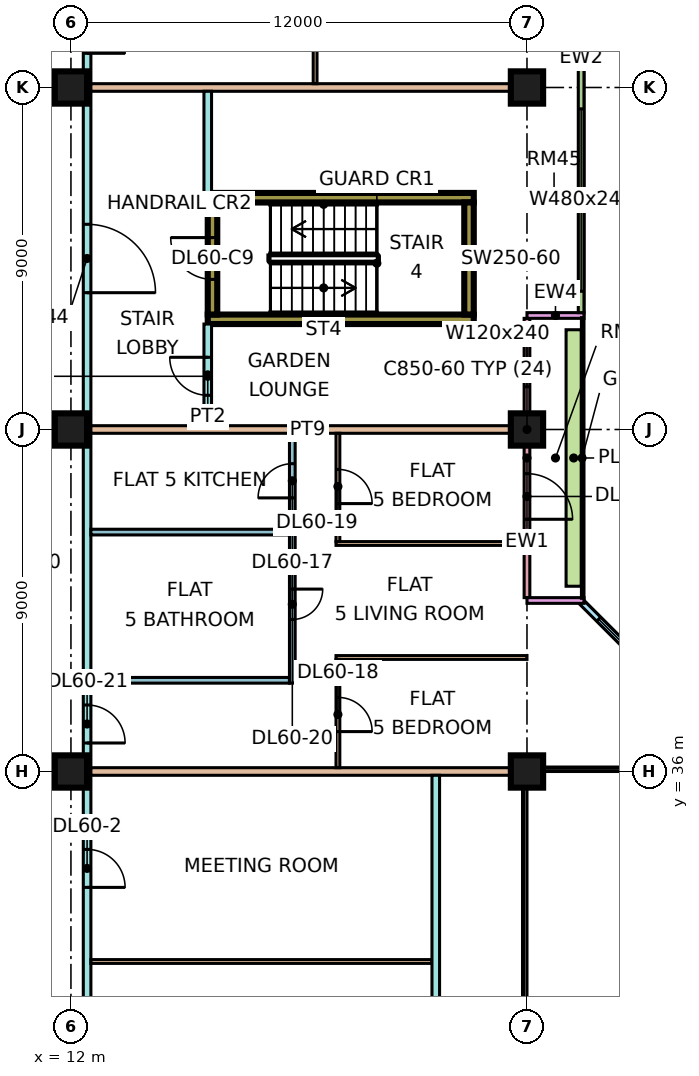
"""IFC4 building model, lengths in metres.
Left out: names, types, materials, properties, quantities, classifications, styles, units other than length and angle.
Written with IfcOpenShell. Run it as: python <this file> out.ifc"""

import sys

from ifc_helpers import new_model, si_unit, direction, frame, frame_2d, origin, origin_2d, place, context, subcontext, project, spatial, rectangle, extrude, element, fill, save


model = new_model("IFC4")
c1 = context("Model", 3, precision=1e-05, world=origin(), true_north=direction((0.0, 1.0)))
c2 = subcontext(c1, "Body", "Model", "MODEL_VIEW")
j1 = project(units=[si_unit("LENGTHUNIT", "METRE"), si_unit("PLANEANGLEUNIT", "RADIAN")], contexts=[c1])
p1 = place(None, origin())
s1 = spatial("IfcSite", under=j1, at=p1, CompositionType="ELEMENT")
p2 = place(p1, origin())
s2 = spatial("IfcBuilding", under=s1, at=p2, CompositionType="ELEMENT")
p3 = place(p2, frame((0.0, 0.0, 252.9)))
s3 = spatial("IfcBuildingStorey", under=s2, at=p3, CompositionType="ELEMENT", Elevation=252.9)
for number, where, z_axis, x_axis in (
    (1, (12.0, 36.0, 0.0), (0.0, 0.0, 1.0), (1.0, 0.0, 0.0)),
    (2, (12.0, 45.0, 0.0), (0.0, 0.0, 1.0), (1.0, 0.0, 0.0)),
    (3, (12.0, 54.0, 0.0), (0.0, 0.0, 1.0), (1.0, 0.0, 0.0)),
    (4, (24.0, 36.0, 0.0), (0.0, 0.0, 1.0), (1.0, 0.0, 0.0)),
    (5, (24.0, 45.0, 0.0), (0.0, 0.0, 1.0), (1.0, 0.0, 0.0)),
    (6, (24.0, 54.0, 0.0), (0.0, 0.0, 1.0), (1.0, 0.0, 0.0)),
):
    element("IfcColumn", number, at=place(p3, frame(where, z_axis=z_axis, x_axis=x_axis)), inside=s3, PredefinedType="COLUMN", context=c2, shape_type="SweptSolid", body=[
        extrude(rectangle(XDim=0.85, YDim=0.85, at=origin_2d()), origin(), (0.0, 0.0, 1.0), 3.75),
    ])
for number, where, z_axis, x_axis in (
    (7, (15.6, 47.9, 0.0), (0.0, 0.0, 1.0), (1.0, 0.0, 0.0)),
    (8, (15.6, 51.1, 0.0), (0.0, 0.0, 1.0), (1.0, 0.0, 0.0)),
):
    element("IfcWall", number, at=place(p3, frame(where, z_axis=z_axis, x_axis=x_axis)), inside=s3, PredefinedType="SHEAR", context=c2, shape_type="SweptSolid", body=[
        extrude(rectangle(XDim=7.0, YDim=0.25, at=frame_2d((3.5, 0.0))), origin(), (0.0, 0.0, 1.0), 3.75),
    ])
p4 = place(p3, frame((15.725, 48.025, 0.0), z_axis=(0.0, 0.0, 1.0), x_axis=(0.0, 1.0, 0.0)))
e9 = element("IfcWall", 9, at=p4, inside=s3, PredefinedType="SHEAR", context=c2, shape_type="SweptSolid", body=[
    extrude(rectangle(XDim=2.95, YDim=0.25, at=frame_2d((1.475, 0.0))), origin(), (0.0, 0.0, 1.0), 3.75),
])
p5 = place(p4, frame((0.925, 0.0, 0.0)))
e10 = element("IfcOpeningElement", 10, at=p5, cuts=e9, PredefinedType="OPENING", context=c2, shape_type="SweptSolid", body=[
    extrude(rectangle(XDim=1.1, YDim=2.2, at=frame_2d((0.55, 1.1))), frame((0.0, 0.135, 0.0), z_axis=(0.0, -1.0, 0.0), x_axis=(1.0, 0.0, 0.0)), (0.0, 0.0, 1.0), 0.27),
])
p6 = place(p3, frame((22.475, 48.025, 0.0), z_axis=(0.0, 0.0, 1.0), x_axis=(0.0, 1.0, 0.0)))
e11 = element("IfcWall", 11, at=p6, inside=s3, PredefinedType="SHEAR", context=c2, shape_type="SweptSolid", body=[
    extrude(rectangle(XDim=2.95, YDim=0.25, at=frame_2d((1.475, 0.0))), origin(), (0.0, 0.0, 1.0), 3.75),
])
p7 = place(p3, frame((28.447, 37.447, 0.0), z_axis=(0.0, 0.0, 1.0), x_axis=(-0.707106781187, 0.707106781187, 0.0)))
e12 = element("IfcWall", 12, at=p7, inside=s3, PredefinedType="SOLIDWALL", context=c2, shape_type="SweptSolid", body=[
    extrude(rectangle(XDim=4.243, YDim=0.15, at=frame_2d((2.121, 0.0))), origin(), (0.0, 0.0, 1.0), 3.3),
])
p8 = place(p7, frame((0.621, 0.0, 0.45)))
e13 = element("IfcOpeningElement", 13, at=p8, cuts=e12, PredefinedType="OPENING", context=c2, shape_type="SweptSolid", body=[
    extrude(rectangle(XDim=3.0, YDim=2.4, at=frame_2d((1.5, 1.2))), frame((0.0, 0.085, 0.0), z_axis=(0.0, -1.0, 0.0), x_axis=(1.0, 0.0, 0.0)), (0.0, 0.0, 1.0), 0.17),
])
p9 = place(p3, frame((24.0, 40.575, 0.0), z_axis=(0.0, 0.0, 1.0), x_axis=(0.0, 1.0, 0.0)))
e14 = element("IfcWall", 14, at=p9, inside=s3, PredefinedType="SOLIDWALL", context=c2, shape_type="SweptSolid", body=[
    extrude(rectangle(XDim=7.35, YDim=0.15, at=frame_2d((3.675, 0.0))), origin(), (0.0, 0.0, 1.0), 3.3),
])
p10 = place(p9, frame((2.062, 0.0, 0.0)))
e15 = element("IfcOpeningElement", 15, at=p10, cuts=e14, PredefinedType="OPENING", context=c2, shape_type="SweptSolid", body=[
    extrude(rectangle(XDim=1.2, YDim=2.4, at=frame_2d((0.6, 1.2))), frame((0.0, 0.085, 0.0), z_axis=(0.0, -1.0, 0.0), x_axis=(1.0, 0.0, 0.0)), (0.0, 0.0, 1.0), 0.17),
])
p11 = place(p9, frame((5.55, 0.0, 0.45)))
e16 = element("IfcOpeningElement", 16, at=p11, cuts=e14, PredefinedType="OPENING", context=c2, shape_type="SweptSolid", body=[
    extrude(rectangle(XDim=1.2, YDim=2.4, at=frame_2d((0.6, 1.2))), frame((0.0, 0.085, 0.0), z_axis=(0.0, -1.0, 0.0), x_axis=(1.0, 0.0, 0.0)), (0.0, 0.0, 1.0), 0.17),
])
for number, where, z_axis, x_axis in (
    (17, (25.5, 40.5, 0.0), (0.0, 0.0, 1.0), (-1.0, 0.0, 0.0)),
    (18, (25.5, 48.0, 0.0), (0.0, 0.0, 1.0), (-1.0, 0.0, 0.0)),
):
    element("IfcWall", number, at=place(p3, frame(where, z_axis=z_axis, x_axis=x_axis)), inside=s3, PredefinedType="SOLIDWALL", context=c2, shape_type="SweptSolid", body=[
        extrude(rectangle(XDim=1.5, YDim=0.15, at=frame_2d((0.75, 0.0))), origin(), (0.0, 0.0, 1.0), 3.3),
    ])
p12 = place(p3, frame((25.425, 48.075, 0.0), z_axis=(0.0, 0.0, 1.0), x_axis=(0.0, 1.0, 0.0)))
e19 = element("IfcWall", 19, at=p12, inside=s3, PredefinedType="SOLIDWALL", context=c2, shape_type="SweptSolid", body=[
    extrude(rectangle(XDim=13.425, YDim=0.15, at=frame_2d((6.712, 0.0))), origin(), (0.0, 0.0, 1.0), 3.3),
])
p13 = place(p12, frame((0.562, 0.0, 0.45)))
e20 = element("IfcOpeningElement", 20, at=p13, cuts=e19, PredefinedType="OPENING", context=c2, shape_type="SweptSolid", body=[
    extrude(rectangle(XDim=4.8, YDim=2.4, at=frame_2d((2.4, 1.2))), frame((0.0, 0.085, 0.0), z_axis=(0.0, -1.0, 0.0), x_axis=(1.0, 0.0, 0.0)), (0.0, 0.0, 1.0), 0.17),
])
p14 = place(p12, frame((6.525, 0.0, 0.45)))
e21 = element("IfcOpeningElement", 21, at=p14, cuts=e19, PredefinedType="OPENING", context=c2, shape_type="SweptSolid", body=[
    extrude(rectangle(XDim=1.8, YDim=2.4, at=frame_2d((0.9, 1.2))), frame((0.0, 0.085, 0.0), z_axis=(0.0, -1.0, 0.0), x_axis=(1.0, 0.0, 0.0)), (0.0, 0.0, 1.0), 0.17),
])
p15 = place(p12, frame((9.675, 0.0, 0.45)))
e22 = element("IfcOpeningElement", 22, at=p15, cuts=e19, PredefinedType="OPENING", context=c2, shape_type="SweptSolid", body=[
    extrude(rectangle(XDim=3.0, YDim=2.4, at=frame_2d((1.5, 1.2))), frame((0.0, 0.085, 0.0), z_axis=(0.0, -1.0, 0.0), x_axis=(1.0, 0.0, 0.0)), (0.0, 0.0, 1.0), 0.17),
])
p16 = place(p3, frame((25.229, 40.875, 0.0), z_axis=(0.0, 0.0, 1.0), x_axis=(0.0, 1.0, 0.0)))
e23 = element("IfcWall", 23, at=p16, inside=s3, PredefinedType="SOLIDWALL", context=c2, shape_type="SweptSolid", body=[
    extrude(rectangle(XDim=6.75, YDim=0.4, at=frame_2d((3.375, 0.0))), origin(), (0.0, 0.0, 1.0), 0.7),
])
p17 = place(p3, frame((12.425, 20.0, 0.0), z_axis=(0.0, 0.0, 1.0), x_axis=(0.0, 1.0, 0.0)))
e24 = element("IfcWall", 24, at=p17, inside=s3, PredefinedType="PARTITIONING", context=c2, shape_type="SweptSolid", body=[
    extrude(rectangle(XDim=42.926, YDim=0.2, at=frame_2d((21.463, 0.0))), origin(), (0.0, 0.0, 1.0), 3.3),
])
p18 = place(p17, frame((7.0, 0.0, 0.0)))
e25 = element("IfcOpeningElement", 25, at=p18, cuts=e24, PredefinedType="OPENING", context=c2, shape_type="SweptSolid", body=[
    extrude(rectangle(XDim=1.0, YDim=2.1, at=frame_2d((0.5, 1.05))), frame((0.0, 0.11, 0.0), z_axis=(0.0, -1.0, 0.0), x_axis=(1.0, 0.0, 0.0)), (0.0, 0.0, 1.0), 0.22),
])
p19 = place(p17, frame((12.95, 0.0, 0.0)))
e26 = element("IfcOpeningElement", 26, at=p19, cuts=e24, PredefinedType="OPENING", context=c2, shape_type="SweptSolid", body=[
    extrude(rectangle(XDim=1.0, YDim=2.1, at=frame_2d((0.5, 1.05))), frame((0.0, 0.11, 0.0), z_axis=(0.0, -1.0, 0.0), x_axis=(1.0, 0.0, 0.0)), (0.0, 0.0, 1.0), 0.22),
])
p20 = place(p17, frame((16.75, 0.0, 0.0)))
e27 = element("IfcOpeningElement", 27, at=p20, cuts=e24, PredefinedType="OPENING", context=c2, shape_type="SweptSolid", body=[
    extrude(rectangle(XDim=1.0, YDim=2.1, at=frame_2d((0.5, 1.05))), frame((0.0, 0.11, 0.0), z_axis=(0.0, -1.0, 0.0), x_axis=(1.0, 0.0, 0.0)), (0.0, 0.0, 1.0), 0.22),
])
p21 = place(p17, frame((34.9, 0.0, 0.0)))
e28 = element("IfcOpeningElement", 28, at=p21, cuts=e24, PredefinedType="OPENING", context=c2, shape_type="SweptSolid", body=[
    extrude(rectangle(XDim=1.0, YDim=2.1, at=frame_2d((0.5, 1.05))), frame((0.0, 0.11, 0.0), z_axis=(0.0, -1.0, 0.0), x_axis=(1.0, 0.0, 0.0)), (0.0, 0.0, 1.0), 0.22),
])
p22 = place(p17, frame((1.15, 0.0, 0.0)))
e29 = element("IfcOpeningElement", 29, at=p22, cuts=e24, PredefinedType="OPENING", context=c2, shape_type="SweptSolid", body=[
    extrude(rectangle(XDim=1.8, YDim=2.1, at=frame_2d((0.9, 1.05))), frame((0.0, 0.11, 0.0), z_axis=(0.0, -1.0, 0.0), x_axis=(1.0, 0.0, 0.0)), (0.0, 0.0, 1.0), 0.22),
])
p23 = place(p17, frame((28.6, 0.0, 0.0)))
e30 = element("IfcOpeningElement", 30, at=p23, cuts=e24, PredefinedType="OPENING", context=c2, shape_type="SweptSolid", body=[
    extrude(rectangle(XDim=1.8, YDim=2.1, at=frame_2d((0.9, 1.05))), frame((0.0, 0.11, 0.0), z_axis=(0.0, -1.0, 0.0), x_axis=(1.0, 0.0, 0.0)), (0.0, 0.0, 1.0), 0.22),
])
p24 = place(p3, frame((12.525, 31.0, 0.0), z_axis=(0.0, 0.0, 1.0), x_axis=(1.0, 0.0, 0.0)))
e31 = element("IfcWall", 31, at=p24, inside=s3, PredefinedType="PARTITIONING", context=c2, shape_type="SweptSolid", body=[
    extrude(rectangle(XDim=8.975, YDim=0.1, at=frame_2d((4.488, 0.0))), origin(), (0.0, 0.0, 1.0), 3.3),
])
p25 = place(p3, frame((12.525, 36.0, 0.0), z_axis=(0.0, 0.0, 1.0), x_axis=(1.0, 0.0, 0.0)))
e32 = element("IfcWall", 32, at=p25, inside=s3, PredefinedType="PARTITIONING", context=c2, shape_type="SweptSolid", body=[
    extrude(rectangle(XDim=11.475, YDim=0.2, at=frame_2d((5.738, 0.0))), origin(), (0.0, 0.0, 1.0), 3.3),
])
for number, where, z_axis, x_axis in (
    (33, (12.525, 38.4, 0.0), (0.0, 0.0, 1.0), (1.0, 0.0, 0.0)),
    (34, (12.525, 42.3, 0.0), (0.0, 0.0, 1.0), (1.0, 0.0, 0.0)),
):
    element("IfcWall", number, at=place(p3, frame(where, z_axis=z_axis, x_axis=x_axis)), inside=s3, PredefinedType="PARTITIONING", context=c2, shape_type="SweptSolid", body=[
        extrude(rectangle(XDim=5.225, YDim=0.15, at=frame_2d((2.613, 0.0))), origin(), (0.0, 0.0, 1.0), 3.3),
    ])
p26 = place(p3, frame((12.525, 45.0, 0.0), z_axis=(0.0, 0.0, 1.0), x_axis=(1.0, 0.0, 0.0)))
e35 = element("IfcWall", 35, at=p26, inside=s3, PredefinedType="PARTITIONING", context=c2, shape_type="SweptSolid", body=[
    extrude(rectangle(XDim=11.401, YDim=0.2, at=frame_2d((5.701, 0.0))), origin(), (0.0, 0.0, 1.0), 3.3),
])
p27 = place(p3, frame((12.525, 54.0, 0.0), z_axis=(0.0, 0.0, 1.0), x_axis=(1.0, 0.0, 0.0)))
e36 = element("IfcWall", 36, at=p27, inside=s3, PredefinedType="PARTITIONING", context=c2, shape_type="SweptSolid", body=[
    extrude(rectangle(XDim=11.475, YDim=0.2, at=frame_2d((5.738, 0.0))), origin(), (0.0, 0.0, 1.0), 3.3),
])
p28 = place(p3, frame((15.6, 45.1, 0.0), z_axis=(0.0, 0.0, 1.0), x_axis=(0.0, 1.0, 0.0)))
e37 = element("IfcWall", 37, at=p28, inside=s3, PredefinedType="PARTITIONING", context=c2, shape_type="SweptSolid", body=[
    extrude(rectangle(XDim=2.675, YDim=0.2, at=frame_2d((1.337, 0.0))), origin(), (0.0, 0.0, 1.0), 3.3),
])
p29 = place(p28, frame((0.8, 0.0, 0.0)))
e38 = element("IfcOpeningElement", 38, at=p29, cuts=e37, PredefinedType="OPENING", context=c2, shape_type="SweptSolid", body=[
    extrude(rectangle(XDim=1.0, YDim=2.1, at=frame_2d((0.5, 1.05))), frame((0.0, 0.11, 0.0), z_axis=(0.0, -1.0, 0.0), x_axis=(1.0, 0.0, 0.0)), (0.0, 0.0, 1.0), 0.22),
])
p30 = place(p3, frame((15.6, 51.225, 0.0), z_axis=(0.0, 0.0, 1.0), x_axis=(0.0, 1.0, 0.0)))
e39 = element("IfcWall", 39, at=p30, inside=s3, PredefinedType="PARTITIONING", context=c2, shape_type="SweptSolid", body=[
    extrude(rectangle(XDim=2.675, YDim=0.2, at=frame_2d((1.337, 0.0))), origin(), (0.0, 0.0, 1.0), 3.3),
])
p31 = place(p3, frame((17.825, 38.325, 0.0), z_axis=(0.0, 0.0, 1.0), x_axis=(0.0, 1.0, 0.0)))
e40 = element("IfcWall", 40, at=p31, inside=s3, PredefinedType="PARTITIONING", context=c2, shape_type="SweptSolid", body=[
    extrude(rectangle(XDim=6.575, YDim=0.15, at=frame_2d((3.288, 0.0))), origin(), (0.0, 0.0, 1.0), 3.3),
])
p32 = place(p31, frame((1.675, 0.0, 0.0)))
e41 = element("IfcOpeningElement", 41, at=p32, cuts=e40, PredefinedType="OPENING", context=c2, shape_type="SweptSolid", body=[
    extrude(rectangle(XDim=0.8, YDim=2.1, at=frame_2d((0.4, 1.05))), frame((0.0, 0.085, 0.0), z_axis=(0.0, -1.0, 0.0), x_axis=(1.0, 0.0, 0.0)), (0.0, 0.0, 1.0), 0.17),
])
p33 = place(p31, frame((4.875, 0.0, 0.0)))
e42 = element("IfcOpeningElement", 42, at=p33, cuts=e40, PredefinedType="OPENING", context=c2, shape_type="SweptSolid", body=[
    extrude(rectangle(XDim=0.9, YDim=2.1, at=frame_2d((0.45, 1.05))), frame((0.0, 0.085, 0.0), z_axis=(0.0, -1.0, 0.0), x_axis=(1.0, 0.0, 0.0)), (0.0, 0.0, 1.0), 0.17),
])
p34 = place(p3, frame((18.425, 54.1, 0.0), z_axis=(0.0, 0.0, 1.0), x_axis=(0.0, 1.0, 0.0)))
e43 = element("IfcWall", 43, at=p34, inside=s3, PredefinedType="PARTITIONING", context=c2, shape_type="SweptSolid", body=[
    extrude(rectangle(XDim=2.85, YDim=0.1, at=frame_2d((1.425, 0.0))), origin(), (0.0, 0.0, 1.0), 3.3),
])
p35 = place(p34, frame((0.95, 0.0, 0.0)))
e44 = element("IfcOpeningElement", 44, at=p35, cuts=e43, PredefinedType="OPENING", context=c2, shape_type="SweptSolid", body=[
    extrude(rectangle(XDim=0.9, YDim=2.1, at=frame_2d((0.45, 1.05))), frame((0.0, 0.06, 0.0), z_axis=(0.0, -1.0, 0.0), x_axis=(1.0, 0.0, 0.0)), (0.0, 0.0, 1.0), 0.12),
])
p36 = place(p3, frame((18.975, 39.0, 0.0), z_axis=(0.0, 0.0, 1.0), x_axis=(1.0, 0.0, 0.0)))
e45 = element("IfcWall", 45, at=p36, inside=s3, PredefinedType="PARTITIONING", context=c2, shape_type="SweptSolid", body=[
    extrude(rectangle(XDim=5.025, YDim=0.1, at=frame_2d((2.512, 0.0))), origin(), (0.0, 0.0, 1.0), 3.3),
])
p37 = place(p3, frame((18.975, 42.0, 0.0), z_axis=(0.0, 0.0, 1.0), x_axis=(1.0, 0.0, 0.0)))
e46 = element("IfcWall", 46, at=p37, inside=s3, PredefinedType="PARTITIONING", context=c2, shape_type="SweptSolid", body=[
    extrude(rectangle(XDim=4.951, YDim=0.1, at=frame_2d((2.476, 0.0))), origin(), (0.0, 0.0, 1.0), 3.3),
])
p38 = place(p3, frame((19.025, 36.1, 0.0), z_axis=(0.0, 0.0, 1.0), x_axis=(0.0, 1.0, 0.0)))
e47 = element("IfcWall", 47, at=p38, inside=s3, PredefinedType="PARTITIONING", context=c2, shape_type="SweptSolid", body=[
    extrude(rectangle(XDim=2.85, YDim=0.1, at=frame_2d((1.425, 0.0))), origin(), (0.0, 0.0, 1.0), 3.3),
])
p39 = place(p38, frame((0.95, 0.0, 0.0)))
e48 = element("IfcOpeningElement", 48, at=p39, cuts=e47, PredefinedType="OPENING", context=c2, shape_type="SweptSolid", body=[
    extrude(rectangle(XDim=0.9, YDim=2.1, at=frame_2d((0.45, 1.05))), frame((0.0, 0.06, 0.0), z_axis=(0.0, -1.0, 0.0), x_axis=(1.0, 0.0, 0.0)), (0.0, 0.0, 1.0), 0.12),
])
p40 = place(p3, frame((19.025, 42.05, 0.0), z_axis=(0.0, 0.0, 1.0), x_axis=(0.0, 1.0, 0.0)))
e49 = element("IfcWall", 49, at=p40, inside=s3, PredefinedType="PARTITIONING", context=c2, shape_type="SweptSolid", body=[
    extrude(rectangle(XDim=2.85, YDim=0.1, at=frame_2d((1.425, 0.0))), origin(), (0.0, 0.0, 1.0), 3.3),
])
p41 = place(p40, frame((1.0, 0.0, 0.0)))
e50 = element("IfcOpeningElement", 50, at=p41, cuts=e49, PredefinedType="OPENING", context=c2, shape_type="SweptSolid", body=[
    extrude(rectangle(XDim=0.9, YDim=2.1, at=frame_2d((0.45, 1.05))), frame((0.0, 0.06, 0.0), z_axis=(0.0, -1.0, 0.0), x_axis=(1.0, 0.0, 0.0)), (0.0, 0.0, 1.0), 0.12),
])
p42 = place(p3, frame((21.6, 23.9, 0.0), z_axis=(0.0, 0.0, 1.0), x_axis=(0.0, 1.0, 0.0)))
e51 = element("IfcWall", 51, at=p42, inside=s3, PredefinedType="PARTITIONING", context=c2, shape_type="SweptSolid", body=[
    extrude(rectangle(XDim=12.0, YDim=0.2, at=frame_2d((6.0, 0.0))), origin(), (0.0, 0.0, 1.0), 3.3),
])
p43 = place(p8, origin())
e52 = element("IfcWindow", 52, at=p43, inside=s3, PartitioningType="SINGLE_PANEL", PredefinedType="WINDOW", context=c2, shape_type="SweptSolid", body=[
    extrude(rectangle(XDim=3.0, YDim=2.4, at=frame_2d((1.5, 1.2))), frame((0.0, 0.03, 0.0), z_axis=(0.0, -1.0, 0.0), x_axis=(1.0, 0.0, 0.0)), (0.0, 0.0, 1.0), 0.06),
])
fill(e13, e52)
p44 = place(p10, frame((1.2, 0.0, 0.0), z_axis=(0.0, 0.0, 1.0), x_axis=(-1.0, 0.0, 0.0)))
e53 = element("IfcDoor", 53, at=p44, inside=s3, OperationType="DOUBLE_DOOR_SINGLE_SWING", PredefinedType="DOOR", context=c2, shape_type="SweptSolid", body=[
    extrude(rectangle(XDim=1.2, YDim=2.4, at=frame_2d((0.6, 1.2))), frame((0.0, 0.025, 0.0), z_axis=(0.0, -1.0, 0.0), x_axis=(1.0, 0.0, 0.0)), (0.0, 0.0, 1.0), 0.05),
])
fill(e15, e53)
p45 = place(p11, origin())
e54 = element("IfcWindow", 54, at=p45, inside=s3, PartitioningType="SINGLE_PANEL", PredefinedType="WINDOW", context=c2, shape_type="SweptSolid", body=[
    extrude(rectangle(XDim=1.2, YDim=2.4, at=frame_2d((0.6, 1.2))), frame((0.0, 0.03, 0.0), z_axis=(0.0, -1.0, 0.0), x_axis=(1.0, 0.0, 0.0)), (0.0, 0.0, 1.0), 0.06),
])
fill(e16, e54)
p46 = place(p13, origin())
e55 = element("IfcWindow", 55, at=p46, inside=s3, PartitioningType="SINGLE_PANEL", PredefinedType="WINDOW", context=c2, shape_type="SweptSolid", body=[
    extrude(rectangle(XDim=4.8, YDim=2.4, at=frame_2d((2.4, 1.2))), frame((0.0, 0.03, 0.0), z_axis=(0.0, -1.0, 0.0), x_axis=(1.0, 0.0, 0.0)), (0.0, 0.0, 1.0), 0.06),
])
fill(e20, e55)
p47 = place(p14, origin())
e56 = element("IfcWindow", 56, at=p47, inside=s3, PartitioningType="SINGLE_PANEL", PredefinedType="WINDOW", context=c2, shape_type="SweptSolid", body=[
    extrude(rectangle(XDim=1.8, YDim=2.4, at=frame_2d((0.9, 1.2))), frame((0.0, 0.03, 0.0), z_axis=(0.0, -1.0, 0.0), x_axis=(1.0, 0.0, 0.0)), (0.0, 0.0, 1.0), 0.06),
])
fill(e21, e56)
p48 = place(p5, frame((1.1, 0.0, 0.0), z_axis=(0.0, 0.0, 1.0), x_axis=(-1.0, 0.0, 0.0)))
e57 = element("IfcDoor", 57, at=p48, inside=s3, OperationType="SINGLE_SWING_RIGHT", PredefinedType="DOOR", context=c2, shape_type="SweptSolid", body=[
    extrude(rectangle(XDim=1.1, YDim=2.2, at=frame_2d((0.55, 1.1))), frame((0.0, 0.025, 0.0), z_axis=(0.0, -1.0, 0.0), x_axis=(1.0, 0.0, 0.0)), (0.0, 0.0, 1.0), 0.05),
])
fill(e10, e57)
p49 = place(p19, frame((1.0, 0.0, 0.0), z_axis=(0.0, 0.0, 1.0), x_axis=(-1.0, 0.0, 0.0)))
e58 = element("IfcDoor", 58, at=p49, inside=s3, OperationType="SINGLE_SWING_LEFT", PredefinedType="DOOR", context=c2, shape_type="SweptSolid", body=[
    extrude(rectangle(XDim=1.0, YDim=2.1, at=frame_2d((0.5, 1.05))), frame((0.0, 0.025, 0.0), z_axis=(0.0, -1.0, 0.0), x_axis=(1.0, 0.0, 0.0)), (0.0, 0.0, 1.0), 0.05),
])
fill(e26, e58)
p50 = place(p32, origin())
e59 = element("IfcDoor", 59, at=p50, inside=s3, OperationType="SINGLE_SWING_RIGHT", PredefinedType="DOOR", context=c2, shape_type="SweptSolid", body=[
    extrude(rectangle(XDim=0.8, YDim=2.1, at=frame_2d((0.4, 1.05))), frame((0.0, 0.025, 0.0), z_axis=(0.0, -1.0, 0.0), x_axis=(1.0, 0.0, 0.0)), (0.0, 0.0, 1.0), 0.05),
])
fill(e41, e59)
p51 = place(p39, frame((0.9, 0.0, 0.0), z_axis=(0.0, 0.0, 1.0), x_axis=(-1.0, 0.0, 0.0)))
e60 = element("IfcDoor", 60, at=p51, inside=s3, OperationType="SINGLE_SWING_LEFT", PredefinedType="DOOR", context=c2, shape_type="SweptSolid", body=[
    extrude(rectangle(XDim=0.9, YDim=2.1, at=frame_2d((0.45, 1.05))), frame((0.0, 0.025, 0.0), z_axis=(0.0, -1.0, 0.0), x_axis=(1.0, 0.0, 0.0)), (0.0, 0.0, 1.0), 0.05),
])
fill(e48, e60)
p52 = place(p41, frame((0.9, 0.0, 0.0), z_axis=(0.0, 0.0, 1.0), x_axis=(-1.0, 0.0, 0.0)))
e61 = element("IfcDoor", 61, at=p52, inside=s3, OperationType="SINGLE_SWING_LEFT", PredefinedType="DOOR", context=c2, shape_type="SweptSolid", body=[
    extrude(rectangle(XDim=0.9, YDim=2.1, at=frame_2d((0.45, 1.05))), frame((0.0, 0.025, 0.0), z_axis=(0.0, -1.0, 0.0), x_axis=(1.0, 0.0, 0.0)), (0.0, 0.0, 1.0), 0.05),
])
fill(e50, e61)
p53 = place(p33, origin())
e62 = element("IfcDoor", 62, at=p53, inside=s3, OperationType="SINGLE_SWING_LEFT", PredefinedType="DOOR", context=c2, shape_type="SweptSolid", body=[
    extrude(rectangle(XDim=0.9, YDim=2.1, at=frame_2d((0.45, 1.05))), frame((0.0, 0.025, 0.0), z_axis=(0.0, -1.0, 0.0), x_axis=(1.0, 0.0, 0.0)), (0.0, 0.0, 1.0), 0.05),
])
fill(e42, e62)
p54 = place(p20, frame((1.0, 0.0, 0.0), z_axis=(0.0, 0.0, 1.0), x_axis=(-1.0, 0.0, 0.0)))
e63 = element("IfcDoor", 63, at=p54, inside=s3, OperationType="SINGLE_SWING_LEFT", PredefinedType="DOOR", context=c2, shape_type="SweptSolid", body=[
    extrude(rectangle(XDim=1.0, YDim=2.1, at=frame_2d((0.5, 1.05))), frame((0.0, 0.025, 0.0), z_axis=(0.0, -1.0, 0.0), x_axis=(1.0, 0.0, 0.0)), (0.0, 0.0, 1.0), 0.05),
])
fill(e27, e63)
p55 = place(p21, frame((1.0, 0.0, 0.0), z_axis=(0.0, 0.0, 1.0), x_axis=(-1.0, 0.0, 0.0)))
e64 = element("IfcDoor", 64, at=p55, inside=s3, OperationType="SINGLE_SWING_LEFT", PredefinedType="DOOR", context=c2, shape_type="SweptSolid", body=[
    extrude(rectangle(XDim=1.0, YDim=2.1, at=frame_2d((0.5, 1.05))), frame((0.0, 0.025, 0.0), z_axis=(0.0, -1.0, 0.0), x_axis=(1.0, 0.0, 0.0)), (0.0, 0.0, 1.0), 0.05),
])
fill(e28, e64)
p56 = place(p23, frame((1.8, 0.0, 0.0), z_axis=(0.0, 0.0, 1.0), x_axis=(-1.0, 0.0, 0.0)))
e65 = element("IfcDoor", 65, at=p56, inside=s3, OperationType="DOUBLE_DOOR_SINGLE_SWING", PredefinedType="DOOR", context=c2, shape_type="SweptSolid", body=[
    extrude(rectangle(XDim=1.8, YDim=2.1, at=frame_2d((0.9, 1.05))), frame((0.0, 0.025, 0.0), z_axis=(0.0, -1.0, 0.0), x_axis=(1.0, 0.0, 0.0)), (0.0, 0.0, 1.0), 0.05),
])
fill(e30, e65)
p57 = place(p29, frame((1.0, 0.0, 0.0), z_axis=(0.0, 0.0, 1.0), x_axis=(-1.0, 0.0, 0.0)))
e66 = element("IfcDoor", 66, at=p57, inside=s3, OperationType="SINGLE_SWING_RIGHT", PredefinedType="DOOR", context=c2, shape_type="SweptSolid", body=[
    extrude(rectangle(XDim=1.0, YDim=2.1, at=frame_2d((0.5, 1.05))), frame((0.0, 0.025, 0.0), z_axis=(0.0, -1.0, 0.0), x_axis=(1.0, 0.0, 0.0)), (0.0, 0.0, 1.0), 0.05),
])
fill(e38, e66)
save(model, sys.argv[1])
